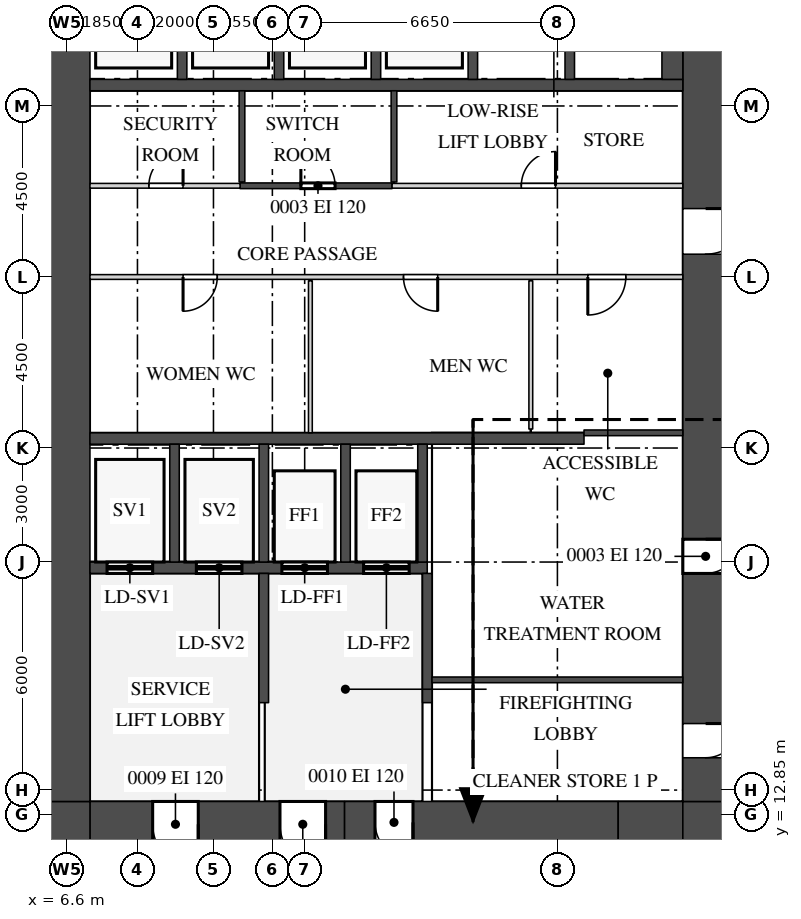
"""IFC4 building model, lengths in metres.
Left out: names, types, materials, properties, quantities, classifications, styles, units other than length and angle.
Written with IfcOpenShell. Run it as: python <this file> out.ifc"""

import sys

from ifc_helpers import new_model, si_unit, direction, frame, frame_2d, origin, place, context, subcontext, project, spatial, rectangle, extrude, source, transform, mapped, element, fill, save


model = new_model("IFC4")
c1 = context("Model", 3, precision=1e-05, world=origin(), true_north=direction((0.0, 1.0)))
c2 = subcontext(c1, "Body", "Model", "MODEL_VIEW")
j1 = project(units=[si_unit("LENGTHUNIT", "METRE"), si_unit("PLANEANGLEUNIT", "RADIAN")], contexts=[c1])
p1 = place(None, origin())
s1 = spatial("IfcSite", under=j1, at=p1, CompositionType="ELEMENT")
p2 = place(p1, origin())
s2 = spatial("IfcBuilding", under=s1, at=p2, CompositionType="ELEMENT")
p3 = place(p2, frame((0.0, 0.0, 73.5)))
s3 = spatial("IfcBuildingStorey", under=s2, at=p3, CompositionType="ELEMENT", Elevation=73.5)
m1 = source(origin(), c2, "Body", "SweptSolid", [
    extrude(rectangle(XDim=6.7, YDim=1.2, at=frame_2d((3.35, 0.0))), origin(), (0.0, 0.0, 1.0), 4.2),
])
p4 = place(p3, frame((7.2, 12.6, 0.0), z_axis=(0.0, 0.0, 1.0), x_axis=(1.0, 0.0, 0.0)))
e1 = element("IfcWall", 1, at=p4, inside=s3, PredefinedType="SHEAR", context=c2, shape_type="MappedRepresentation", body=[
    mapped(m1, transform((0.0, 0.0, 0.0))),
])
m2 = source(origin(), c2, "Body", "SweptSolid", [
    extrude(rectangle(XDim=1.2, YDim=2.1, at=frame_2d((0.6, 1.05))), frame((0.0, 0.61, 0.0), z_axis=(0.0, -1.0, 0.0), x_axis=(1.0, 0.0, 0.0)), (0.0, 0.0, 1.0), 1.22),
])
p5 = place(p4, frame((5.0, 0.0, 0.0)))
e2 = element("IfcOpeningElement", 2, at=p5, cuts=e1, PredefinedType="OPENING", context=c2, shape_type="MappedRepresentation", body=[
    mapped(m2, transform((0.0, 0.0, 0.0))),
])
p6 = place(p4, frame((1.65, 0.0, 0.0)))
e3 = element("IfcOpeningElement", 3, at=p6, cuts=e1, PredefinedType="OPENING", context=c2, shape_type="MappedRepresentation", body=[
    mapped(m2, transform((0.0, 0.0, 0.0))),
])
m3 = source(origin(), c2, "Body", "SweptSolid", [
    extrude(rectangle(XDim=7.2, YDim=1.1, at=frame_2d((3.6, 0.0))), origin(), (0.0, 0.0, 1.0), 4.2),
])
p7 = place(p3, frame((13.9, 12.65, 0.0), z_axis=(0.0, 0.0, 1.0), x_axis=(1.0, 0.0, 0.0)))
e4 = element("IfcWall", 4, at=p7, inside=s3, PredefinedType="SHEAR", context=c2, shape_type="MappedRepresentation", body=[
    mapped(m3, transform((0.0, 0.0, 0.0))),
])
m4 = source(origin(), c2, "Body", "SweptSolid", [
    extrude(rectangle(XDim=1.0, YDim=2.1, at=frame_2d((0.5, 1.05))), frame((0.0, 0.56, 0.0), z_axis=(0.0, -1.0, 0.0), x_axis=(1.0, 0.0, 0.0)), (0.0, 0.0, 1.0), 1.12),
])
p8 = place(p7, frame((0.8, 0.0, 0.0)))
e5 = element("IfcOpeningElement", 5, at=p8, cuts=e4, PredefinedType="OPENING", context=c2, shape_type="MappedRepresentation", body=[
    mapped(m4, transform((0.0, 0.0, 0.0))),
])
m5 = source(origin(), c2, "Body", "SweptSolid", [
    extrude(rectangle(XDim=1.7, YDim=1.2, at=frame_2d((0.85, 0.0))), origin(), (0.0, 0.0, 1.0), 4.2),
])
p9 = place(p3, frame((21.1, 12.6, 0.0), z_axis=(0.0, 0.0, 1.0), x_axis=(1.0, 0.0, 0.0)))
e6 = element("IfcWall", 6, at=p9, inside=s3, PredefinedType="SHEAR", context=c2, shape_type="MappedRepresentation", body=[
    mapped(m5, transform((0.0, 0.0, 0.0))),
])
m6 = source(origin(), c2, "Body", "SweptSolid", [
    extrude(rectangle(XDim=1.2, YDim=1.2, at=frame_2d((0.6, 0.0))), origin(), (0.0, 0.0, 1.0), 4.2),
])
for number, where, z_axis, x_axis in (
    (7, (22.8, 12.6, 0.0), (0.0, 0.0, 1.0), (1.0, 0.0, 0.0)),
    (8, (6.0, 12.6, 0.0), (0.0, 0.0, 1.0), (1.0, 0.0, 0.0)),
):
    element("IfcWall", number, at=place(p3, frame(where, z_axis=z_axis, x_axis=x_axis)), inside=s3, PredefinedType="SHEAR", context=c2, shape_type="MappedRepresentation", body=[
        mapped(m6, transform((0.0, 0.0, 0.0))),
    ])
m7 = source(origin(), c2, "Body", "SweptSolid", [
    extrude(rectangle(XDim=27.6, YDim=1.2, at=frame_2d((13.8, 0.0))), origin(), (0.0, 0.0, 1.0), 4.2),
])
p10 = place(p3, frame((23.4, 13.2, 0.0), z_axis=(0.0, 0.0, 1.0), x_axis=(0.0, 1.0, 0.0)))
e9 = element("IfcWall", 9, at=p10, inside=s3, PredefinedType="SHEAR", context=c2, shape_type="MappedRepresentation", body=[
    mapped(m7, transform((0.0, 0.0, 0.0))),
])
m8 = source(origin(), c2, "Body", "SweptSolid", [
    extrude(rectangle(XDim=1.8, YDim=2.1, at=frame_2d((0.9, 1.05))), frame((0.0, 0.61, 0.0), z_axis=(0.0, -1.0, 0.0), x_axis=(1.0, 0.0, 0.0)), (0.0, 0.0, 1.0), 1.22),
])
p11 = place(p10, frame((22.4, 0.0, 0.0)))
e10 = element("IfcOpeningElement", 10, at=p11, cuts=e9, PredefinedType="OPENING", context=c2, shape_type="MappedRepresentation", body=[
    mapped(m8, transform((0.0, 0.0, 0.0))),
])
p12 = place(p10, frame((14.4, 0.0, 0.0)))
e11 = element("IfcOpeningElement", 11, at=p12, cuts=e9, PredefinedType="OPENING", context=c2, shape_type="MappedRepresentation", body=[
    mapped(m2, transform((0.0, 0.0, 0.0))),
])
m9 = source(origin(), c2, "Body", "SweptSolid", [
    extrude(rectangle(XDim=0.9, YDim=2.1, at=frame_2d((0.45, 1.05))), frame((0.0, 0.61, 0.0), z_axis=(0.0, -1.0, 0.0), x_axis=(1.0, 0.0, 0.0)), (0.0, 0.0, 1.0), 1.22),
])
p13 = place(p10, frame((1.15, 0.0, 0.0)))
e12 = element("IfcOpeningElement", 12, at=p13, cuts=e9, PredefinedType="OPENING", context=c2, shape_type="MappedRepresentation", body=[
    mapped(m9, transform((0.0, 0.0, 0.0))),
])
p14 = place(p10, frame((6.0, 0.0, 0.0)))
e13 = element("IfcOpeningElement", 13, at=p14, cuts=e9, PredefinedType="OPENING", context=c2, shape_type="MappedRepresentation", body=[
    mapped(m9, transform((0.0, 0.0, 0.0))),
])
p15 = place(p3, frame((6.6, 13.2, 0.0), z_axis=(0.0, 0.0, 1.0), x_axis=(0.0, 1.0, 0.0)))
e14 = element("IfcWall", 14, at=p15, inside=s3, PredefinedType="SHEAR", context=c2, shape_type="MappedRepresentation", body=[
    mapped(m7, transform((0.0, 0.0, 0.0))),
])
m10 = source(origin(), c2, "Body", "SweptSolid", [
    extrude(rectangle(XDim=13.0, YDim=0.3, at=frame_2d((6.5, 0.0))), origin(), (0.0, 0.0, 1.0), 4.2),
])
p16 = place(p3, frame((7.2, 22.75, 0.0), z_axis=(0.0, 0.0, 1.0), x_axis=(1.0, 0.0, 0.0)))
e15 = element("IfcWall", 15, at=p16, inside=s3, PredefinedType="STANDARD", context=c2, shape_type="MappedRepresentation", body=[
    mapped(m10, transform((0.0, 0.0, 0.0))),
])
m11 = source(origin(), c2, "Body", "SweptSolid", [
    extrude(rectangle(XDim=8.875, YDim=0.3, at=frame_2d((4.438, 0.0))), origin(), (0.0, 0.0, 1.0), 4.2),
])
p17 = place(p3, frame((7.2, 19.35, 0.0), z_axis=(0.0, 0.0, 1.0), x_axis=(1.0, 0.0, 0.0)))
e16 = element("IfcWall", 16, at=p17, inside=s3, PredefinedType="STANDARD", context=c2, shape_type="MappedRepresentation", body=[
    mapped(m11, transform((0.0, 0.0, 0.0))),
])
m12 = source(origin(), c2, "Body", "SweptSolid", [
    extrude(rectangle(XDim=1.2, YDim=2.1, at=frame_2d((0.6, 1.05))), frame((0.0, 0.16, 0.0), z_axis=(0.0, -1.0, 0.0), x_axis=(1.0, 0.0, 0.0)), (0.0, 0.0, 1.0), 0.32),
])
p18 = place(p17, frame((0.45, 0.0, 0.0)))
e17 = element("IfcOpeningElement", 17, at=p18, cuts=e16, PredefinedType="OPENING", context=c2, shape_type="MappedRepresentation", body=[
    mapped(m12, transform((0.0, 0.0, 0.0))),
])
p19 = place(p17, frame((2.8, 0.0, 0.0)))
e18 = element("IfcOpeningElement", 18, at=p19, cuts=e16, PredefinedType="OPENING", context=c2, shape_type="MappedRepresentation", body=[
    mapped(m12, transform((0.0, 0.0, 0.0))),
])
p20 = place(p17, frame((5.05, 0.0, 0.0)))
e19 = element("IfcOpeningElement", 19, at=p20, cuts=e16, PredefinedType="OPENING", context=c2, shape_type="MappedRepresentation", body=[
    mapped(m12, transform((0.0, 0.0, 0.0))),
])
p21 = place(p17, frame((7.2, 0.0, 0.0)))
e20 = element("IfcOpeningElement", 20, at=p21, cuts=e16, PredefinedType="OPENING", context=c2, shape_type="MappedRepresentation", body=[
    mapped(m12, transform((0.0, 0.0, 0.0))),
])
m13 = source(origin(), c2, "Body", "SweptSolid", [
    extrude(rectangle(XDim=15.6, YDim=0.3, at=frame_2d((7.8, 0.0))), origin(), (0.0, 0.0, 1.0), 4.2),
])
p22 = place(p3, frame((7.2, 32.05, 0.0), z_axis=(0.0, 0.0, 1.0), x_axis=(1.0, 0.0, 0.0)))
e21 = element("IfcWall", 21, at=p22, inside=s3, PredefinedType="STANDARD", context=c2, shape_type="MappedRepresentation", body=[
    mapped(m13, transform((0.0, 0.0, 0.0))),
])
m14 = source(origin(), c2, "Body", "SweptSolid", [
    extrude(rectangle(XDim=3.1, YDim=0.25, at=frame_2d((1.55, 0.0))), origin(), (0.0, 0.0, 1.0), 4.2),
])
for number, where, z_axis, x_axis in (
    (22, (9.425, 19.5, 0.0), (0.0, 0.0, 1.0), (0.0, 1.0, 0.0)),
    (23, (11.775, 19.5, 0.0), (0.0, 0.0, 1.0), (0.0, 1.0, 0.0)),
    (24, (13.925, 19.5, 0.0), (0.0, 0.0, 1.0), (0.0, 1.0, 0.0)),
    (25, (15.95, 19.5, 0.0), (0.0, 0.0, 1.0), (0.0, 1.0, 0.0)),
):
    element("IfcWall", number, at=place(p3, frame(where, z_axis=z_axis, x_axis=x_axis)), inside=s3, PredefinedType="STANDARD", context=c2, shape_type="MappedRepresentation", body=[
        mapped(m14, transform((0.0, 0.0, 0.0))),
    ])
m15 = source(origin(), c2, "Body", "SweptSolid", [
    extrude(rectangle(XDim=2.4, YDim=0.25, at=frame_2d((1.2, 0.0))), origin(), (0.0, 0.0, 1.0), 4.2),
])
for number, where, z_axis, x_axis in (
    (26, (9.625, 32.2, 0.0), (0.0, 0.0, 1.0), (0.0, 1.0, 0.0)),
    (27, (12.175, 32.2, 0.0), (0.0, 0.0, 1.0), (0.0, 1.0, 0.0)),
    (28, (14.725, 32.2, 0.0), (0.0, 0.0, 1.0), (0.0, 1.0, 0.0)),
    (29, (17.275, 32.2, 0.0), (0.0, 0.0, 1.0), (0.0, 1.0, 0.0)),
    (30, (19.825, 32.2, 0.0), (0.0, 0.0, 1.0), (0.0, 1.0, 0.0)),
):
    element("IfcWall", number, at=place(p3, frame(where, z_axis=z_axis, x_axis=x_axis)), inside=s3, PredefinedType="STANDARD", context=c2, shape_type="MappedRepresentation", body=[
        mapped(m15, transform((0.0, 0.0, 0.0))),
    ])
m16 = source(origin(), c2, "Body", "SweptSolid", [
    extrude(rectangle(XDim=2.4, YDim=0.55, at=frame_2d((1.2, 0.0))), origin(), (0.0, 0.0, 1.0), 4.2),
])
p23 = place(p3, frame((22.525, 32.2, 0.0), z_axis=(0.0, 0.0, 1.0), x_axis=(0.0, 1.0, 0.0)))
e31 = element("IfcWall", 31, at=p23, inside=s3, PredefinedType="STANDARD", context=c2, shape_type="MappedRepresentation", body=[
    mapped(m16, transform((0.0, 0.0, 0.0))),
])
m17 = source(origin(), c2, "Body", "SweptSolid", [
    extrude(rectangle(XDim=3.4, YDim=0.25, at=frame_2d((1.7, 0.0))), origin(), (0.0, 0.0, 1.0), 4.2),
])
for number, where, z_axis, x_axis in (
    (32, (16.075, 15.8, 0.0), (0.0, 0.0, 1.0), (0.0, 1.0, 0.0)),
    (33, (11.775, 15.8, 0.0), (0.0, 0.0, 1.0), (0.0, 1.0, 0.0)),
):
    element("IfcWall", number, at=place(p3, frame(where, z_axis=z_axis, x_axis=x_axis)), inside=s3, PredefinedType="STANDARD", context=c2, shape_type="MappedRepresentation", body=[
        mapped(m17, transform((0.0, 0.0, 0.0))),
    ])
m18 = source(origin(), c2, "Body", "SweptSolid", [
    extrude(rectangle(XDim=6.6, YDim=0.15, at=frame_2d((3.3, 0.0))), origin(), (0.0, 0.0, 1.0), 4.3),
])
p24 = place(p3, frame((16.2, 16.4, 0.0), z_axis=(0.0, 0.0, 1.0), x_axis=(1.0, 0.0, 0.0)))
e34 = element("IfcWall", 34, at=p24, inside=s3, PredefinedType="PARTITIONING", context=c2, shape_type="MappedRepresentation", body=[
    mapped(m18, transform((0.0, 0.0, 0.0))),
])
m19 = source(origin(), c2, "Body", "SweptSolid", [
    extrude(rectangle(XDim=4.0, YDim=0.1, at=frame_2d((2.0, 0.0))), origin(), (0.0, 0.0, 1.0), 4.3),
])
p25 = place(p3, frame((13.0, 22.9, 0.0), z_axis=(0.0, 0.0, 1.0), x_axis=(0.0, 1.0, 0.0)))
e35 = element("IfcWall", 35, at=p25, inside=s3, PredefinedType="PARTITIONING", context=c2, shape_type="MappedRepresentation", body=[
    mapped(m19, transform((0.0, 0.0, 0.0))),
])
m20 = source(origin(), c2, "Body", "SweptSolid", [
    extrude(rectangle(XDim=2.6, YDim=0.15, at=frame_2d((1.3, 0.0))), origin(), (0.0, 0.0, 1.0), 4.3),
])
p26 = place(p3, frame((20.2, 22.9, 0.0), z_axis=(0.0, 0.0, 1.0), x_axis=(1.0, 0.0, 0.0)))
e36 = element("IfcWall", 36, at=p26, inside=s3, PredefinedType="PARTITIONING", context=c2, shape_type="MappedRepresentation", body=[
    mapped(m20, transform((0.0, 0.0, 0.0))),
])
m21 = source(origin(), c2, "Body", "SweptSolid", [
    extrude(rectangle(XDim=3.9, YDim=0.1, at=frame_2d((1.95, 0.0))), origin(), (0.0, 0.0, 1.0), 4.3),
])
p27 = place(p3, frame((18.8, 23.0, 0.0), z_axis=(0.0, 0.0, 1.0), x_axis=(0.0, 1.0, 0.0)))
e37 = element("IfcWall", 37, at=p27, inside=s3, PredefinedType="PARTITIONING", context=c2, shape_type="MappedRepresentation", body=[
    mapped(m21, transform((0.0, 0.0, 0.0))),
])
m22 = source(origin(), c2, "Body", "SweptSolid", [
    extrude(rectangle(XDim=15.6, YDim=0.125, at=frame_2d((7.8, 0.0))), origin(), (0.0, 0.0, 1.0), 4.3),
])
p28 = place(p3, frame((7.2, 27.0, 0.0), z_axis=(0.0, 0.0, 1.0), x_axis=(1.0, 0.0, 0.0)))
e38 = element("IfcWall", 38, at=p28, inside=s3, PredefinedType="PARTITIONING", context=c2, shape_type="MappedRepresentation", body=[
    mapped(m22, transform((0.0, 0.0, 0.0))),
])
m23 = source(origin(), c2, "Body", "SweptSolid", [
    extrude(rectangle(XDim=0.9, YDim=2.1, at=frame_2d((0.45, 1.05))), frame((0.0, 0.073, 0.0), z_axis=(0.0, -1.0, 0.0), x_axis=(1.0, 0.0, 0.0)), (0.0, 0.0, 1.0), 0.145),
])
p29 = place(p28, frame((2.45, 0.0, 0.0)))
e39 = element("IfcOpeningElement", 39, at=p29, cuts=e38, PredefinedType="OPENING", context=c2, shape_type="MappedRepresentation", body=[
    mapped(m23, transform((0.0, 0.0, 0.0))),
])
p30 = place(p28, frame((8.25, 0.0, 0.0)))
e40 = element("IfcOpeningElement", 40, at=p30, cuts=e38, PredefinedType="OPENING", context=c2, shape_type="MappedRepresentation", body=[
    mapped(m23, transform((0.0, 0.0, 0.0))),
])
m24 = source(origin(), c2, "Body", "SweptSolid", [
    extrude(rectangle(XDim=1.0, YDim=2.1, at=frame_2d((0.5, 1.05))), frame((0.0, 0.073, 0.0), z_axis=(0.0, -1.0, 0.0), x_axis=(1.0, 0.0, 0.0)), (0.0, 0.0, 1.0), 0.145),
])
p31 = place(p28, frame((13.1, 0.0, 0.0)))
e41 = element("IfcOpeningElement", 41, at=p31, cuts=e38, PredefinedType="OPENING", context=c2, shape_type="MappedRepresentation", body=[
    mapped(m24, transform((0.0, 0.0, 0.0))),
])
m25 = source(origin(), c2, "Body", "SweptSolid", [
    extrude(rectangle(XDim=3.95, YDim=0.125, at=frame_2d((1.975, 0.0))), origin(), (0.0, 0.0, 1.0), 4.3),
])
p32 = place(p3, frame((7.2, 29.4, 0.0), z_axis=(0.0, 0.0, 1.0), x_axis=(1.0, 0.0, 0.0)))
e42 = element("IfcWall", 42, at=p32, inside=s3, PredefinedType="PARTITIONING", context=c2, shape_type="MappedRepresentation", body=[
    mapped(m25, transform((0.0, 0.0, 0.0))),
])
p33 = place(p32, frame((1.55, 0.0, 0.0)))
e43 = element("IfcOpeningElement", 43, at=p33, cuts=e42, PredefinedType="OPENING", context=c2, shape_type="MappedRepresentation", body=[
    mapped(m23, transform((0.0, 0.0, 0.0))),
])
m26 = source(origin(), c2, "Body", "SweptSolid", [
    extrude(rectangle(XDim=4.0, YDim=0.15, at=frame_2d((2.0, 0.0))), origin(), (0.0, 0.0, 1.0), 4.3),
])
p34 = place(p3, frame((11.15, 29.4, 0.0), z_axis=(0.0, 0.0, 1.0), x_axis=(1.0, 0.0, 0.0)))
e44 = element("IfcWall", 44, at=p34, inside=s3, PredefinedType="PARTITIONING", context=c2, shape_type="MappedRepresentation", body=[
    mapped(m26, transform((0.0, 0.0, 0.0))),
])
m27 = source(origin(), c2, "Body", "SweptSolid", [
    extrude(rectangle(XDim=0.9, YDim=2.1, at=frame_2d((0.45, 1.05))), frame((0.0, 0.085, 0.0), z_axis=(0.0, -1.0, 0.0), x_axis=(1.0, 0.0, 0.0)), (0.0, 0.0, 1.0), 0.17),
])
p35 = place(p34, frame((1.6, 0.0, 0.0)))
e45 = element("IfcOpeningElement", 45, at=p35, cuts=e44, PredefinedType="OPENING", context=c2, shape_type="MappedRepresentation", body=[
    mapped(m27, transform((0.0, 0.0, 0.0))),
])
m28 = source(origin(), c2, "Body", "SweptSolid", [
    extrude(rectangle(XDim=7.65, YDim=0.125, at=frame_2d((3.825, 0.0))), origin(), (0.0, 0.0, 1.0), 4.3),
])
p36 = place(p3, frame((15.15, 29.4, 0.0), z_axis=(0.0, 0.0, 1.0), x_axis=(1.0, 0.0, 0.0)))
e46 = element("IfcWall", 46, at=p36, inside=s3, PredefinedType="PARTITIONING", context=c2, shape_type="MappedRepresentation", body=[
    mapped(m28, transform((0.0, 0.0, 0.0))),
])
p37 = place(p36, frame((3.4, 0.0, 0.0)))
e47 = element("IfcOpeningElement", 47, at=p37, cuts=e46, PredefinedType="OPENING", context=c2, shape_type="MappedRepresentation", body=[
    mapped(m23, transform((0.0, 0.0, 0.0))),
])
m29 = source(origin(), c2, "Body", "SweptSolid", [
    extrude(rectangle(XDim=2.4, YDim=0.15, at=frame_2d((1.2, 0.0))), origin(), (0.0, 0.0, 1.0), 4.3),
])
for number, where, z_axis, x_axis in (
    (48, (11.2, 29.5, 0.0), (0.0, 0.0, 1.0), (0.0, 1.0, 0.0)),
    (49, (15.2, 29.5, 0.0), (0.0, 0.0, 1.0), (0.0, 1.0, 0.0)),
):
    element("IfcWall", number, at=place(p3, frame(where, z_axis=z_axis, x_axis=x_axis)), inside=s3, PredefinedType="PARTITIONING", context=c2, shape_type="MappedRepresentation", body=[
        mapped(m29, transform((0.0, 0.0, 0.0))),
    ])
m30 = source(origin(), c2, "Body", "SweptSolid", [
    extrude(rectangle(XDim=1.2, YDim=2.1, at=frame_2d((0.6, 1.05))), frame((0.0, 0.55, 0.0), z_axis=(0.0, -1.0, 0.0), x_axis=(1.0, 0.0, 0.0)), (0.0, 0.0, 1.0), 1.1),
])
p38 = place(p12, origin())
e50 = element("IfcDoor", 50, at=p38, inside=s3, OperationType="SINGLE_SWING_RIGHT", PredefinedType="DOOR", context=c2, shape_type="MappedRepresentation", body=[
    mapped(m30, transform((0.0, 0.0, 0.0))),
])
fill(e11, e50)
m31 = source(origin(), c2, "Body", "SweptSolid", [
    extrude(rectangle(XDim=0.9, YDim=2.1, at=frame_2d((0.45, 1.05))), frame((0.0, 0.025, 0.0), z_axis=(0.0, -1.0, 0.0), x_axis=(1.0, 0.0, 0.0)), (0.0, 0.0, 1.0), 0.05),
])
p39 = place(p33, origin())
e51 = element("IfcDoor", 51, at=p39, inside=s3, OperationType="SINGLE_SWING_LEFT", PredefinedType="DOOR", context=c2, shape_type="MappedRepresentation", body=[
    mapped(m31, transform((0.0, 0.0, 0.0))),
])
fill(e43, e51)
p40 = place(p35, origin())
e52 = element("IfcDoor", 52, at=p40, inside=s3, OperationType="SINGLE_SWING_RIGHT", PredefinedType="DOOR", context=c2, shape_type="MappedRepresentation", body=[
    mapped(m31, transform((0.0, 0.0, 0.0))),
])
fill(e45, e52)
p41 = place(p37, origin())
e53 = element("IfcDoor", 53, at=p41, inside=s3, OperationType="SINGLE_SWING_LEFT", PredefinedType="DOOR", context=c2, shape_type="MappedRepresentation", body=[
    mapped(m31, transform((0.0, 0.0, 0.0))),
])
fill(e47, e53)
p42 = place(p29, origin())
e54 = element("IfcDoor", 54, at=p42, inside=s3, OperationType="SINGLE_SWING_LEFT", PredefinedType="DOOR", context=c2, shape_type="MappedRepresentation", body=[
    mapped(m31, transform((0.0, 0.0, 0.0))),
])
fill(e39, e54)
p43 = place(p30, origin())
e55 = element("IfcDoor", 55, at=p43, inside=s3, OperationType="SINGLE_SWING_RIGHT", PredefinedType="DOOR", context=c2, shape_type="MappedRepresentation", body=[
    mapped(m31, transform((0.0, 0.0, 0.0))),
])
fill(e40, e55)
m32 = source(origin(), c2, "Body", "SweptSolid", [
    extrude(rectangle(XDim=1.0, YDim=2.1, at=frame_2d((0.5, 1.05))), frame((0.0, 0.025, 0.0), z_axis=(0.0, -1.0, 0.0), x_axis=(1.0, 0.0, 0.0)), (0.0, 0.0, 1.0), 0.05),
])
p44 = place(p31, origin())
e56 = element("IfcDoor", 56, at=p44, inside=s3, OperationType="SINGLE_SWING_LEFT", PredefinedType="DOOR", context=c2, shape_type="MappedRepresentation", body=[
    mapped(m32, transform((0.0, 0.0, 0.0))),
])
fill(e41, e56)
m33 = source(origin(), c2, "Body", "SweptSolid", [
    extrude(rectangle(XDim=0.9, YDim=2.1, at=frame_2d((0.45, 1.05))), frame((0.0, 0.55, 0.0), z_axis=(0.0, -1.0, 0.0), x_axis=(1.0, 0.0, 0.0)), (0.0, 0.0, 1.0), 1.1),
])
p45 = place(p13, origin())
e57 = element("IfcDoor", 57, at=p45, inside=s3, OperationType="SINGLE_SWING_RIGHT", PredefinedType="DOOR", context=c2, shape_type="MappedRepresentation", body=[
    mapped(m33, transform((0.0, 0.0, 0.0))),
])
fill(e12, e57)
p46 = place(p14, origin())
e58 = element("IfcDoor", 58, at=p46, inside=s3, OperationType="SINGLE_SWING_RIGHT", PredefinedType="DOOR", context=c2, shape_type="MappedRepresentation", body=[
    mapped(m33, transform((0.0, 0.0, 0.0))),
])
fill(e13, e58)
p47 = place(p5, origin())
e59 = element("IfcDoor", 59, at=p47, inside=s3, OperationType="SINGLE_SWING_RIGHT", PredefinedType="DOOR", context=c2, shape_type="MappedRepresentation", body=[
    mapped(m30, transform((0.0, 0.0, 0.0))),
])
fill(e2, e59)
p48 = place(p6, origin())
e60 = element("IfcDoor", 60, at=p48, inside=s3, OperationType="SINGLE_SWING_RIGHT", PredefinedType="DOOR", context=c2, shape_type="MappedRepresentation", body=[
    mapped(m30, transform((0.0, 0.0, 0.0))),
])
fill(e3, e60)
m34 = source(origin(), c2, "Body", "SweptSolid", [
    extrude(rectangle(XDim=1.0, YDim=2.1, at=frame_2d((0.5, 1.05))), frame((0.0, 0.5, 0.0), z_axis=(0.0, -1.0, 0.0), x_axis=(1.0, 0.0, 0.0)), (0.0, 0.0, 1.0), 1.0),
])
p49 = place(p8, origin())
e61 = element("IfcDoor", 61, at=p49, inside=s3, OperationType="SINGLE_SWING_RIGHT", PredefinedType="DOOR", context=c2, shape_type="MappedRepresentation", body=[
    mapped(m34, transform((0.0, 0.0, 0.0))),
])
fill(e5, e61)
m35 = source(origin(), c2, "Body", "SweptSolid", [
    extrude(rectangle(XDim=1.2, YDim=2.1, at=frame_2d((0.6, 1.05))), frame((0.0, 0.025, 0.0), z_axis=(0.0, -1.0, 0.0), x_axis=(1.0, 0.0, 0.0)), (0.0, 0.0, 1.0), 0.05),
])
p50 = place(p18, origin())
e62 = element("IfcDoor", 62, at=p50, inside=s3, OperationType="DOUBLE_DOOR_SLIDING", PredefinedType="DOOR", context=c2, shape_type="MappedRepresentation", body=[
    mapped(m35, transform((0.0, 0.0, 0.0))),
])
fill(e17, e62)
p51 = place(p19, origin())
e63 = element("IfcDoor", 63, at=p51, inside=s3, OperationType="DOUBLE_DOOR_SLIDING", PredefinedType="DOOR", context=c2, shape_type="MappedRepresentation", body=[
    mapped(m35, transform((0.0, 0.0, 0.0))),
])
fill(e18, e63)
p52 = place(p20, origin())
e64 = element("IfcDoor", 64, at=p52, inside=s3, OperationType="DOUBLE_DOOR_SLIDING", PredefinedType="DOOR", context=c2, shape_type="MappedRepresentation", body=[
    mapped(m35, transform((0.0, 0.0, 0.0))),
])
fill(e19, e64)
p53 = place(p21, origin())
e65 = element("IfcDoor", 65, at=p53, inside=s3, OperationType="DOUBLE_DOOR_SLIDING", PredefinedType="DOOR", context=c2, shape_type="MappedRepresentation", body=[
    mapped(m35, transform((0.0, 0.0, 0.0))),
])
fill(e20, e65)
save(model, sys.argv[1])
